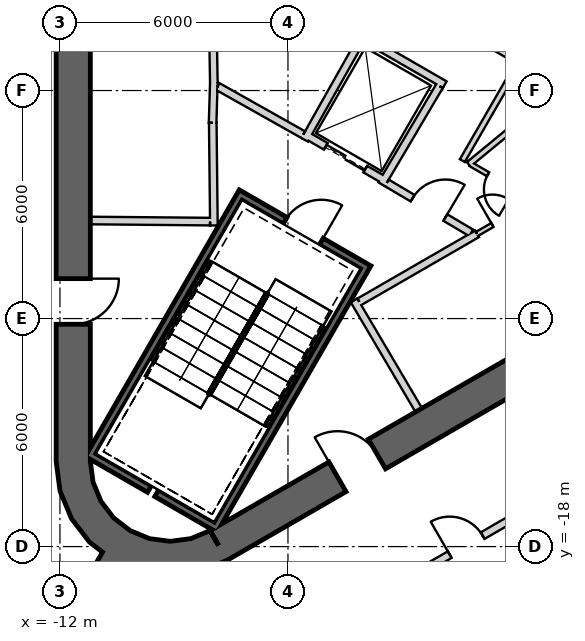
"""IFC4 building model, lengths in metres.
Left out: names, types, materials, properties, quantities, classifications, styles, units other than length and angle.
Written with IfcOpenShell. Run it as: python <this file> out.ifc"""

import sys

from ifc_helpers import new_model, si_unit, direction, frame, frame_2d, origin, place, context, subcontext, project, spatial, polyline, rectangle, outline, extrude, element, fill, save


model = new_model("IFC4")
c1 = context("Model", 3, precision=1e-05, world=origin(), true_north=direction((0.0, 1.0)))
c2 = subcontext(c1, "Body", "Model", "MODEL_VIEW")
j1 = project(units=[si_unit("LENGTHUNIT", "METRE"), si_unit("PLANEANGLEUNIT", "RADIAN")], contexts=[c1])
p1 = place(None, origin())
s1 = spatial("IfcSite", under=j1, at=p1, CompositionType="ELEMENT")
p2 = place(p1, origin())
s2 = spatial("IfcBuilding", under=s1, at=p2, CompositionType="ELEMENT")
p3 = place(p2, frame((0.0, 0.0, 292.7)))
s3 = spatial("IfcBuildingStorey", under=s2, at=p3, CompositionType="ELEMENT", Elevation=292.7)
p4 = place(p3, frame((-11.65, 15.762, 0.0), z_axis=(0.0, 0.0, 1.0), x_axis=(0.0, -1.0, 0.0)))
e1 = element("IfcWall", 1, at=p4, inside=s3, PredefinedType="SHEAR", context=c2, shape_type="SweptSolid", body=[
    extrude(rectangle(XDim=31.523, YDim=0.9, at=frame_2d((15.762, 0.0))), origin(), (0.0, 0.0, 1.0), 6.0),
])
p5 = place(p4, frame((3.612, 0.0, 0.0)))
e2 = element("IfcOpeningElement", 2, at=p5, cuts=e1, PredefinedType="OPENING", context=c2, shape_type="SweptSolid", body=[
    extrude(rectangle(XDim=1.2, YDim=2.4, at=frame_2d((0.6, 1.2))), frame((0.0, 0.46, 0.0), z_axis=(0.0, -1.0, 0.0), x_axis=(1.0, 0.0, 0.0)), (0.0, 0.0, 1.0), 0.92),
])
p6 = place(p4, frame((26.712, 0.0, 0.0)))
e3 = element("IfcOpeningElement", 3, at=p6, cuts=e1, PredefinedType="OPENING", context=c2, shape_type="SweptSolid", body=[
    extrude(rectangle(XDim=1.2, YDim=2.4, at=frame_2d((0.6, 1.2))), frame((0.0, 0.46, 0.0), z_axis=(0.0, -1.0, 0.0), x_axis=(1.0, 0.0, 0.0)), (0.0, 0.0, 1.0), 0.92),
])
p7 = place(p3, frame((-7.825, -17.97, 0.0), z_axis=(0.0, 0.0, 1.0), x_axis=(0.866028369851, 0.499994862586, 0.0)))
e4 = element("IfcWall", 4, at=p7, inside=s3, PredefinedType="SHEAR", context=c2, shape_type="SweptSolid", body=[
    extrude(rectangle(XDim=31.523, YDim=0.9, at=frame_2d((15.762, 0.0))), origin(), (0.0, 0.0, 1.0), 6.0),
])
p8 = place(p7, frame((26.712, 0.0, 0.0)))
e5 = element("IfcOpeningElement", 5, at=p8, cuts=e4, PredefinedType="OPENING", context=c2, shape_type="SweptSolid", body=[
    extrude(rectangle(XDim=1.2, YDim=2.4, at=frame_2d((0.6, 1.2))), frame((0.0, 0.46, 0.0), z_axis=(0.0, -1.0, 0.0), x_axis=(1.0, 0.0, 0.0)), (0.0, 0.0, 1.0), 0.92),
])
p9 = place(p7, frame((3.612, 0.0, 0.0)))
e6 = element("IfcOpeningElement", 6, at=p9, cuts=e4, PredefinedType="OPENING", context=c2, shape_type="SweptSolid", body=[
    extrude(rectangle(XDim=1.2, YDim=2.4, at=frame_2d((0.6, 1.2))), frame((0.0, 0.46, 0.0), z_axis=(0.0, -1.0, 0.0), x_axis=(1.0, 0.0, 0.0)), (0.0, 0.0, 1.0), 0.92),
])
p10 = place(p3, origin())
e7 = element("IfcWall", 7, at=p10, inside=s3, PredefinedType="SHEAR", context=c2, shape_type="SweptSolid", body=[
    extrude(outline(polyline([(-12.1, -15.762), (-11.998, -16.538), (-11.698, -17.262), (-11.221, -17.883), (-10.6, -18.36), (-9.876, -18.659), (-9.1, -18.762), (-8.323, -18.659), (-7.6, -18.36), (-8.05, -17.58), (-8.556, -17.79), (-9.1, -17.862), (-9.644, -17.79), (-10.15, -17.58), (-10.585, -17.247), (-10.919, -16.812), (-11.128, -16.305), (-11.2, -15.762), (-12.1, -15.762)])), origin(), (0.0, 0.0, 1.0), 6.0),
])
p11 = place(p3, frame((-10.575, -18.316, 0.0), z_axis=(0.0, 0.0, 1.0), x_axis=(-0.500007350791, -0.866021159762, 0.0)))
e8 = element("IfcWall", 8, at=p11, inside=s3, PredefinedType="SHEAR", context=c2, shape_type="SweptSolid", body=[
    extrude(rectangle(XDim=9.965, YDim=0.7, at=frame_2d((4.982, 0.0))), origin(), (0.0, 0.0, 1.0), 6.0),
])
p12 = place(p11, frame((3.15, 0.0, 0.0)))
e9 = element("IfcOpeningElement", 9, at=p12, cuts=e8, PredefinedType="OPENING", context=c2, shape_type="SweptSolid", body=[
    extrude(rectangle(XDim=1.4, YDim=2.4, at=frame_2d((0.7, 1.2))), frame((0.0, 0.36, 0.0), z_axis=(0.0, -1.0, 0.0), x_axis=(1.0, 0.0, 0.0)), (0.0, 0.0, 1.0), 0.72),
])
p13 = place(p3, frame((-2.998, -28.258, 0.0), z_axis=(0.0, 0.0, 1.0), x_axis=(0.902255372, 0.43120209148, 0.0)))
e10 = element("IfcWall", 10, at=p13, inside=s3, PredefinedType="SOLIDWALL", context=c2, shape_type="SweptSolid", body=[
    extrude(rectangle(XDim=33.548, YDim=0.24, at=frame_2d((16.774, 0.0))), origin(), (0.0, 0.0, 1.0), 5.7),
])
p14 = place(p3, frame((-7.95, -5.772, 0.0), z_axis=(0.0, 0.0, 1.0), x_axis=(-0.030803413295, -0.999525462272, 0.0)))
e11 = element("IfcWall", 11, at=p14, inside=s3, PredefinedType="PLUMBINGWALL", context=c2, shape_type="SweptSolid", body=[
    extrude(rectangle(XDim=1.078, YDim=0.2, at=frame_2d((0.539, 0.0))), origin(), (0.0, 0.0, 1.0), 5.7),
])
p15 = place(p3, frame((-7.98, -4.05, 0.0), z_axis=(0.0, 0.0, 1.0), x_axis=(0.016809909365, -0.999858703491, 0.0)))
e12 = element("IfcWall", 12, at=p15, inside=s3, PredefinedType="PLUMBINGWALL", context=c2, shape_type="SweptSolid", body=[
    extrude(rectangle(XDim=1.844, YDim=0.2, at=frame_2d((0.922, 0.0))), origin(), (0.0, 0.0, 1.0), 5.7),
])
p16 = place(p3, frame((-7.979, -6.85, 0.0), z_axis=(0.0, 0.0, 1.0), x_axis=(0.011121475088, -0.999938154483, 0.0)))
e13 = element("IfcWall", 13, at=p16, inside=s3, PredefinedType="PLUMBINGWALL", context=c2, shape_type="SweptSolid", body=[
    extrude(rectangle(XDim=2.7, YDim=0.2, at=frame_2d((1.35, 0.0))), origin(), (0.0, 0.0, 1.0), 5.7),
])
p17 = place(p3, frame((-8.05, -9.449, 0.0), z_axis=(0.0, 0.0, 1.0), x_axis=(-0.999957467379, 0.009222983926, 0.0)))
e14 = element("IfcWall", 14, at=p17, inside=s3, PredefinedType="PLUMBINGWALL", context=c2, shape_type="SweptSolid", body=[
    extrude(rectangle(XDim=3.15, YDim=0.2, at=frame_2d((1.575, 0.0))), origin(), (0.0, 0.0, 1.0), 5.7),
])
p18 = place(p3, frame((-3.905, -10.563, -0.35), z_axis=(0.0, 0.0, 1.0), x_axis=(-0.500012932018, -0.866017937352, 0.0)))
e15 = element("IfcWall", 15, at=p18, inside=s3, PredefinedType="SHEAR", context=c2, shape_type="SweptSolid", body=[
    extrude(rectangle(XDim=8.1, YDim=0.2, at=frame_2d((4.05, 0.0))), origin(), (0.0, 0.0, 1.0), 6.05),
])
p19 = place(p3, frame((-11.282, -15.541, -0.35), z_axis=(0.0, 0.0, 1.0), x_axis=(0.866000578957, -0.500042995397, 0.0)))
e16 = element("IfcWall", 16, at=p19, inside=s3, PredefinedType="SHEAR", context=c2, shape_type="SweptSolid", body=[
    extrude(rectangle(XDim=1.89, YDim=0.2, at=frame_2d((0.945, 0.0))), origin(), (0.0, 0.0, 1.0), 6.05),
])
p20 = place(p3, frame((-9.455, -16.596, -0.35), z_axis=(0.0, 0.0, 1.0), x_axis=(0.866038843867, -0.499976720371, 0.0)))
e17 = element("IfcWall", 17, at=p20, inside=s3, PredefinedType="SHEAR", context=c2, shape_type="SweptSolid", body=[
    extrude(rectangle(XDim=1.69, YDim=0.2, at=frame_2d((0.845, 0.0))), origin(), (0.0, 0.0, 1.0), 6.05),
])
p21 = place(p3, frame((-7.196, -8.663, -0.35), z_axis=(0.0, 0.0, 1.0), x_axis=(-0.499997992926, -0.866026562566, 0.0)))
e18 = element("IfcWall", 18, at=p21, inside=s3, PredefinedType="SHEAR", context=c2, shape_type="SweptSolid", body=[
    extrude(rectangle(XDim=7.9, YDim=0.2, at=frame_2d((3.95, 0.0))), origin(), (0.0, 0.0, 1.0), 6.05),
])
p22 = place(p3, frame((-4.041, -10.599, -0.35), z_axis=(0.0, 0.0, 1.0), x_axis=(-0.866047807691, 0.499961193289, 0.0)))
e19 = element("IfcWall", 19, at=p22, inside=s3, PredefinedType="SHEAR", context=c2, shape_type="SweptSolid", body=[
    extrude(rectangle(XDim=3.6, YDim=0.2, at=frame_2d((1.8, 0.0))), origin(), (0.0, 0.0, 1.0), 6.05),
])
p23 = place(p22, frame((1.25, 0.0, 0.35)))
e20 = element("IfcOpeningElement", 20, at=p23, cuts=e19, PredefinedType="OPENING", context=c2, shape_type="SweptSolid", body=[
    extrude(rectangle(XDim=1.1, YDim=2.1, at=frame_2d((0.55, 1.05))), frame((0.0, 0.11, 0.0), z_axis=(0.0, -1.0, 0.0), x_axis=(1.0, 0.0, 0.0)), (0.0, 0.0, 1.0), 0.22),
])
p24 = place(p3, frame((-3.446, -8.368, 0.0), z_axis=(0.0, 0.0, 1.0), x_axis=(-0.866024647952, 0.500001309137, 0.0)))
e21 = element("IfcWall", 21, at=p24, inside=s3, PredefinedType="PLUMBINGWALL", context=c2, shape_type="SweptSolid", body=[
    extrude(rectangle(XDim=2.4, YDim=0.2, at=frame_2d((1.2, 0.0))), origin(), (0.0, 0.0, 1.0), 5.7),
])
p25 = place(p24, frame((0.6, 0.0, 0.0)))
e22 = element("IfcOpeningElement", 22, at=p25, cuts=e21, PredefinedType="OPENING", context=c2, shape_type="SweptSolid", body=[
    extrude(rectangle(XDim=1.2, YDim=2.4, at=frame_2d((0.6, 1.2))), frame((0.0, 0.11, 0.0), z_axis=(0.0, -1.0, 0.0), x_axis=(1.0, 0.0, 0.0)), (0.0, 0.0, 1.0), 0.22),
])
p26 = place(p3, frame((-5.562, -7.296, 0.0), z_axis=(0.0, 0.0, 1.0), x_axis=(0.491322718731, 0.870977603649, 0.0)))
e23 = element("IfcWall", 23, at=p26, inside=s3, PredefinedType="PLUMBINGWALL", context=c2, shape_type="SweptSolid", body=[
    extrude(rectangle(XDim=3.1, YDim=0.2, at=frame_2d((1.55, 0.0))), origin(), (0.0, 0.0, 1.0), 5.7),
])
p27 = place(p3, frame((-3.814, -4.726, 0.0), z_axis=(0.0, 0.0, 1.0), x_axis=(0.866000409959, -0.500043288077, 0.0)))
e24 = element("IfcWall", 24, at=p27, inside=s3, PredefinedType="PLUMBINGWALL", context=c2, shape_type="SweptSolid", body=[
    extrude(rectangle(XDim=2.24, YDim=0.2, at=frame_2d((1.12, 0.0))), origin(), (0.0, 0.0, 1.0), 5.7),
])
p28 = place(p3, frame((-2.012, -5.882, 0.0), z_axis=(0.0, 0.0, 1.0), x_axis=(-0.508619639323, -0.860991325447, 0.0)))
e25 = element("IfcWall", 25, at=p28, inside=s3, PredefinedType="PLUMBINGWALL", context=c2, shape_type="SweptSolid", body=[
    extrude(rectangle(XDim=3.0, YDim=0.2, at=frame_2d((1.5, 0.0))), origin(), (0.0, 0.0, 1.0), 5.7),
])
p29 = place(p3, frame((-4.26, -11.524, 0.0), z_axis=(0.0, 0.0, 1.0), x_axis=(0.507997497166, -0.861358544901, 0.0)))
e26 = element("IfcWall", 26, at=p29, inside=s3, PredefinedType="PARTITIONING", context=c2, shape_type="SweptSolid", body=[
    extrude(rectangle(XDim=3.35, YDim=0.2, at=frame_2d((1.675, 0.0))), origin(), (0.0, 0.0, 1.0), 5.7),
])
p30 = place(p3, frame((-1.024, -9.771, 0.0), z_axis=(0.0, 0.0, 1.0), x_axis=(-0.866029903013, -0.499992207027, 0.0)))
e27 = element("IfcWall", 27, at=p30, inside=s3, PredefinedType="PARTITIONING", context=c2, shape_type="SweptSolid", body=[
    extrude(rectangle(XDim=3.578, YDim=0.2, at=frame_2d((1.789, 0.0))), origin(), (0.0, 0.0, 1.0), 5.7),
])
p31 = place(p3, frame((0.493, -8.896, 0.0), z_axis=(0.0, 0.0, 1.0), x_axis=(-0.86605557906, -0.499947731247, 0.0)))
e28 = element("IfcWall", 28, at=p31, inside=s3, PredefinedType="PARTITIONING", context=c2, shape_type="SweptSolid", body=[
    extrude(rectangle(XDim=1.751, YDim=0.12, at=frame_2d((0.875, 0.0))), origin(), (0.0, 0.0, 1.0), 5.7),
])
p32 = place(p31, frame((0.486, 0.0, 0.0)))
e29 = element("IfcOpeningElement", 29, at=p32, cuts=e28, PredefinedType="OPENING", context=c2, shape_type="SweptSolid", body=[
    extrude(rectangle(XDim=0.8, YDim=2.1, at=frame_2d((0.4, 1.05))), frame((0.0, 0.07, 0.0), z_axis=(0.0, -1.0, 0.0), x_axis=(1.0, 0.0, 0.0)), (0.0, 0.0, 1.0), 0.14),
])
p33 = place(p3, frame((-7.849, -5.894, 0.0), z_axis=(0.0, 0.0, 1.0), x_axis=(0.871340486379, -0.490678873396, 0.0)))
e30 = element("IfcWall", 30, at=p33, inside=s3, PredefinedType="PARTITIONING", context=c2, shape_type="SweptSolid", body=[
    extrude(rectangle(XDim=2.581, YDim=0.2, at=frame_2d((1.291, 0.0))), origin(), (0.0, 0.0, 1.0), 5.7),
])
p34 = place(p3, frame((-3.401, -8.43, 0.0), z_axis=(0.0, 0.0, 1.0), x_axis=(0.860630814782, -0.509229418482, 0.0)))
e31 = element("IfcWall", 31, at=p34, inside=s3, PredefinedType="PARTITIONING", context=c2, shape_type="SweptSolid", body=[
    extrude(rectangle(XDim=2.582, YDim=0.2, at=frame_2d((1.291, 0.0))), origin(), (0.0, 0.0, 1.0), 5.7),
])
p35 = place(p34, frame((0.791, 0.0, 0.0)))
e32 = element("IfcOpeningElement", 32, at=p35, cuts=e31, PredefinedType="OPENING", context=c2, shape_type="SweptSolid", body=[
    extrude(rectangle(XDim=1.0, YDim=2.1, at=frame_2d((0.5, 1.05))), frame((0.0, 0.11, 0.0), z_axis=(0.0, -1.0, 0.0), x_axis=(1.0, 0.0, 0.0)), (0.0, 0.0, 1.0), 0.22),
])
p36 = place(p3, frame((6.834, -1.302, 0.0), z_axis=(0.0, 0.0, 1.0), x_axis=(-0.772564687607, -0.634936062499, 0.0)))
e33 = element("IfcWall", 33, at=p36, inside=s3, PredefinedType="PLUMBINGWALL", context=c2, shape_type="SweptSolid", body=[
    extrude(rectangle(XDim=10.457, YDim=0.15, at=frame_2d((5.229, 0.0))), origin(), (0.0, 0.0, 1.0), 5.7),
])
p37 = place(p3, frame((0.126, -5.182, 0.0), z_axis=(0.0, 0.0, 1.0), x_axis=(-0.499956128963, -0.866050731258, 0.0)))
e34 = element("IfcWall", 34, at=p37, inside=s3, PredefinedType="PLUMBINGWALL", context=c2, shape_type="SweptSolid", body=[
    extrude(rectangle(XDim=3.075, YDim=0.15, at=frame_2d((1.538, 0.0))), origin(), (0.0, 0.0, 1.0), 5.7),
])
p38 = place(p3, frame((-1.579, -4.285, 0.0), z_axis=(0.0, 0.0, 1.0), x_axis=(0.866033964044, -0.499985172903, 0.0)))
e35 = element("IfcWall", 35, at=p38, inside=s3, PredefinedType="PLUMBINGWALL", context=c2, shape_type="SweptSolid", body=[
    extrude(rectangle(XDim=1.85, YDim=0.15, at=frame_2d((0.925, 0.0))), origin(), (0.0, 0.0, 1.0), 5.7),
])
p39 = place(p3, frame((-1.195, -7.936, 0.0), z_axis=(0.0, 0.0, 1.0), x_axis=(0.864979954643, -0.50180641493, 0.0)))
e36 = element("IfcWall", 36, at=p39, inside=s3, PredefinedType="PARTITIONING", context=c2, shape_type="SweptSolid", body=[
    extrude(rectangle(XDim=1.861, YDim=0.12, at=frame_2d((0.931, 0.0))), origin(), (0.0, 0.0, 1.0), 5.7),
])
p40 = place(p39, frame((0.531, 0.0, 0.0)))
e37 = element("IfcOpeningElement", 37, at=p40, cuts=e36, PredefinedType="OPENING", context=c2, shape_type="SweptSolid", body=[
    extrude(rectangle(XDim=0.8, YDim=2.1, at=frame_2d((0.4, 1.05))), frame((0.0, 0.07, 0.0), z_axis=(0.0, -1.0, 0.0), x_axis=(1.0, 0.0, 0.0)), (0.0, 0.0, 1.0), 0.14),
])
p41 = place(p3, frame((-3.322, -19.123, 0.0), z_axis=(0.0, 0.0, 1.0), x_axis=(0.866020577108, 0.500008359956, 0.0)))
e38 = element("IfcWall", 38, at=p41, inside=s3, PredefinedType="PARTITIONING", context=c2, shape_type="SweptSolid", body=[
    extrude(rectangle(XDim=4.805, YDim=0.2, at=frame_2d((2.402, 0.0))), origin(), (0.0, 0.0, 1.0), 5.07),
])
p42 = place(p41, frame((1.822, 0.0, 0.0)))
e39 = element("IfcOpeningElement", 39, at=p42, cuts=e38, PredefinedType="OPENING", context=c2, shape_type="SweptSolid", body=[
    extrude(rectangle(XDim=1.0, YDim=2.1, at=frame_2d((0.5, 1.05))), frame((0.0, 0.11, 0.0), z_axis=(0.0, -1.0, 0.0), x_axis=(1.0, 0.0, 0.0)), (0.0, 0.0, 1.0), 0.22),
])
p43 = place(p23, origin())
e40 = element("IfcDoor", 40, at=p43, inside=s3, OperationType="SINGLE_SWING_LEFT", PredefinedType="USERDEFINED", context=c2, shape_type="SweptSolid", body=[
    extrude(rectangle(XDim=1.1, YDim=2.1, at=frame_2d((0.55, 1.05))), frame((0.0, 0.025, 0.0), z_axis=(0.0, -1.0, 0.0), x_axis=(1.0, 0.0, 0.0)), (0.0, 0.0, 1.0), 0.05),
])
fill(e20, e40)
p44 = place(p35, origin())
e41 = element("IfcDoor", 41, at=p44, inside=s3, OperationType="SINGLE_SWING_RIGHT", PredefinedType="USERDEFINED", context=c2, shape_type="SweptSolid", body=[
    extrude(rectangle(XDim=1.0, YDim=2.1, at=frame_2d((0.5, 1.05))), frame((0.0, 0.025, 0.0), z_axis=(0.0, -1.0, 0.0), x_axis=(1.0, 0.0, 0.0)), (0.0, 0.0, 1.0), 0.05),
])
fill(e32, e41)
p45 = place(p25, origin())
e42 = element("IfcDoor", 42, at=p45, inside=s3, OperationType="SLIDING_TO_LEFT", PredefinedType="USERDEFINED", context=c2, shape_type="SweptSolid", body=[
    extrude(rectangle(XDim=1.2, YDim=2.4, at=frame_2d((0.6, 1.2))), frame((0.0, 0.025, 0.0), z_axis=(0.0, -1.0, 0.0), x_axis=(1.0, 0.0, 0.0)), (0.0, 0.0, 1.0), 0.05),
])
fill(e22, e42)
p46 = place(p40, origin())
e43 = element("IfcDoor", 43, at=p46, inside=s3, OperationType="SINGLE_SWING_RIGHT", PredefinedType="USERDEFINED", context=c2, shape_type="SweptSolid", body=[
    extrude(rectangle(XDim=0.8, YDim=2.1, at=frame_2d((0.4, 1.05))), frame((0.0, 0.025, 0.0), z_axis=(0.0, -1.0, 0.0), x_axis=(1.0, 0.0, 0.0)), (0.0, 0.0, 1.0), 0.05),
])
fill(e37, e43)
p47 = place(p32, origin())
e44 = element("IfcDoor", 44, at=p47, inside=s3, OperationType="SINGLE_SWING_RIGHT", PredefinedType="USERDEFINED", context=c2, shape_type="SweptSolid", body=[
    extrude(rectangle(XDim=0.8, YDim=2.1, at=frame_2d((0.4, 1.05))), frame((0.0, 0.025, 0.0), z_axis=(0.0, -1.0, 0.0), x_axis=(1.0, 0.0, 0.0)), (0.0, 0.0, 1.0), 0.05),
])
fill(e29, e44)
p48 = place(p42, origin())
e45 = element("IfcDoor", 45, at=p48, inside=s3, OperationType="SINGLE_SWING_LEFT", PredefinedType="USERDEFINED", context=c2, shape_type="SweptSolid", body=[
    extrude(rectangle(XDim=1.0, YDim=2.1, at=frame_2d((0.5, 1.05))), frame((0.0, 0.025, 0.0), z_axis=(0.0, -1.0, 0.0), x_axis=(1.0, 0.0, 0.0)), (0.0, 0.0, 1.0), 0.05),
])
fill(e39, e45)
p49 = place(p6, origin())
e46 = element("IfcDoor", 46, at=p49, inside=s3, OperationType="SINGLE_SWING_LEFT", PredefinedType="USERDEFINED", context=c2, shape_type="SweptSolid", body=[
    extrude(rectangle(XDim=1.2, YDim=2.4, at=frame_2d((0.6, 1.2))), frame((0.0, 0.025, 0.0), z_axis=(0.0, -1.0, 0.0), x_axis=(1.0, 0.0, 0.0)), (0.0, 0.0, 1.0), 0.05),
])
fill(e3, e46)
p50 = place(p9, origin())
e47 = element("IfcDoor", 47, at=p50, inside=s3, OperationType="SINGLE_SWING_LEFT", PredefinedType="USERDEFINED", context=c2, shape_type="SweptSolid", body=[
    extrude(rectangle(XDim=1.2, YDim=2.4, at=frame_2d((0.6, 1.2))), frame((0.0, 0.025, 0.0), z_axis=(0.0, -1.0, 0.0), x_axis=(1.0, 0.0, 0.0)), (0.0, 0.0, 1.0), 0.05),
])
fill(e6, e47)
save(model, sys.argv[1])
